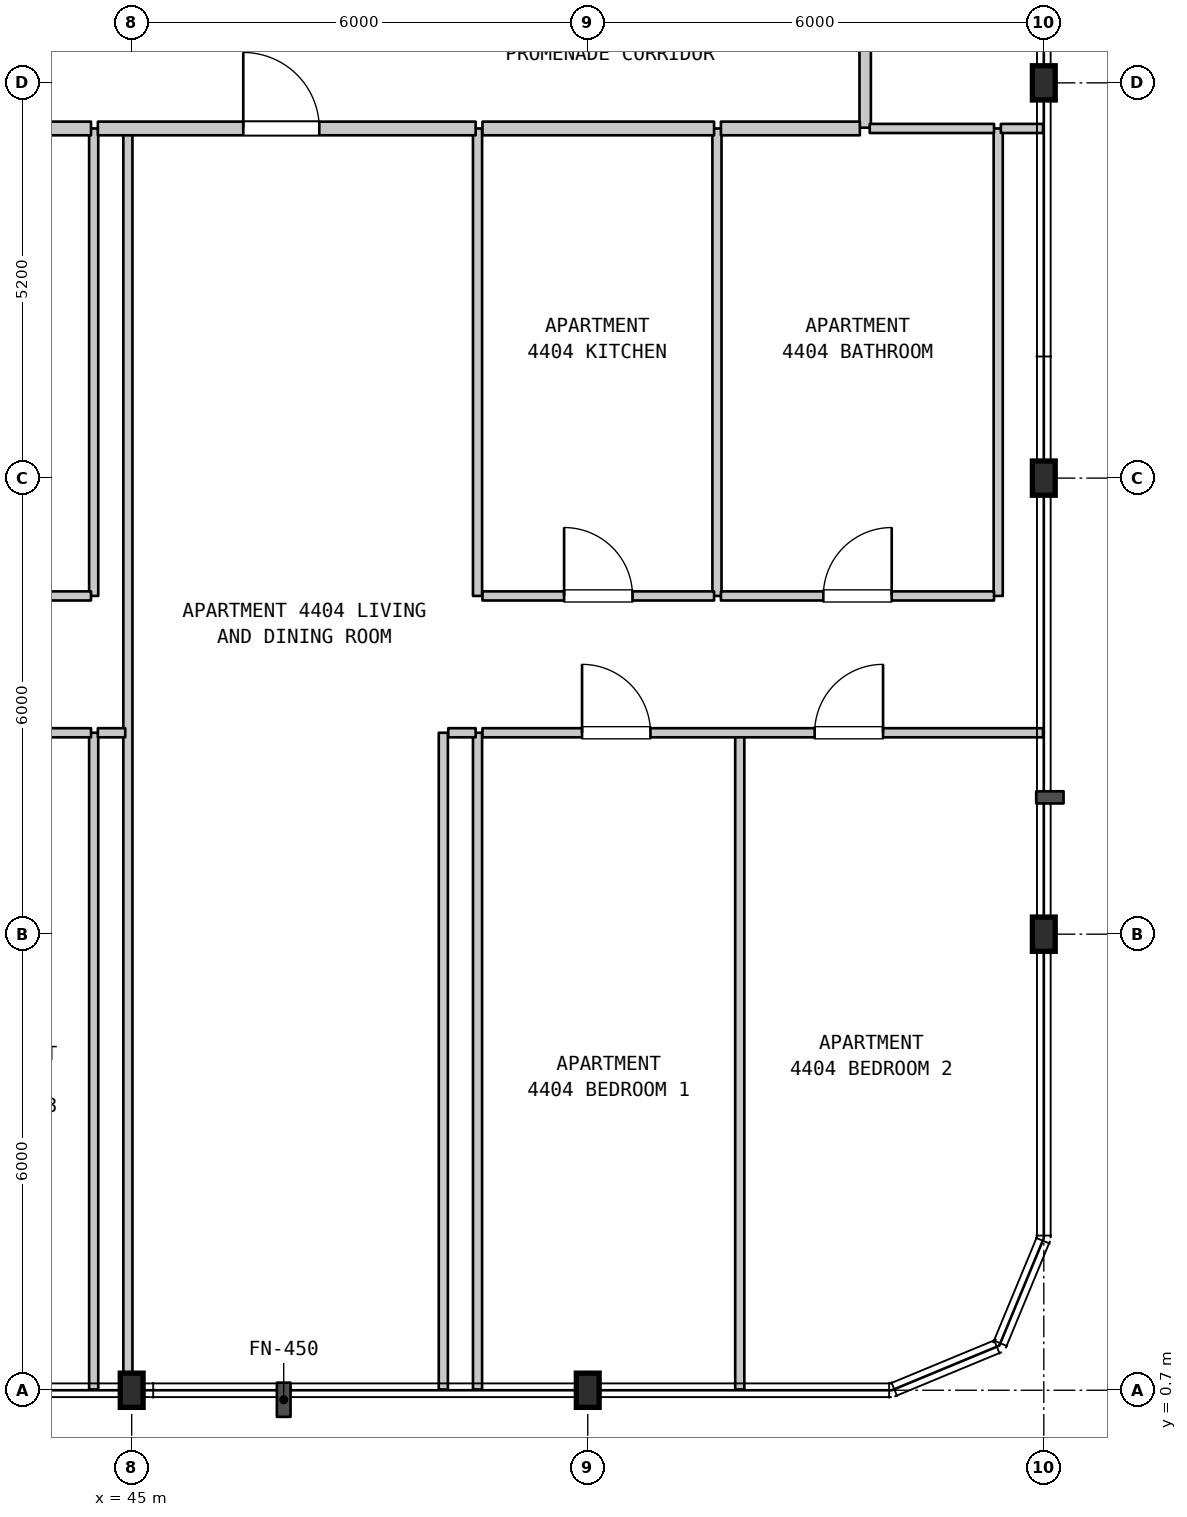
"""IFC4 building model, lengths in metres.
Left out: names, types, materials, properties, quantities, classifications, styles, units other than length and angle.
Written with IfcOpenShell. Run it as: python <this file> out.ifc"""

import sys

from ifc_helpers import new_model, si_unit, direction, frame, frame_2d, origin, origin_2d, place, context, subcontext, project, spatial, rectangle, i_section, extrude, element, fill, save


model = new_model("IFC4")
c1 = context("Model", 3, precision=1e-05, world=origin(), true_north=direction((0.0, 1.0)))
c2 = subcontext(c1, "Body", "Model", "MODEL_VIEW")
j1 = project(units=[si_unit("LENGTHUNIT", "METRE"), si_unit("PLANEANGLEUNIT", "RADIAN")], contexts=[c1])
p1 = place(None, origin())
s1 = spatial("IfcSite", under=j1, at=p1, CompositionType="ELEMENT")
p2 = place(p1, origin())
s2 = spatial("IfcBuilding", under=s1, at=p2, CompositionType="ELEMENT")
p3 = place(p2, frame((0.0, 0.0, 180.2)))
s3 = spatial("IfcBuildingStorey", under=s2, at=p3, CompositionType="ELEMENT", Elevation=180.2)
for number, where, z_axis, x_axis in (
    (1, (45.0, 0.7, 0.0), (0.0, 0.0, 1.0), (1.0, 0.0, 0.0)),
    (2, (51.0, 0.7, 0.0), (0.0, 0.0, 1.0), (1.0, 0.0, 0.0)),
    (3, (57.0, 6.7, 0.0), (0.0, 0.0, 1.0), (1.0, 0.0, 0.0)),
    (4, (57.0, 12.7, 0.0), (0.0, 0.0, 1.0), (1.0, 0.0, 0.0)),
    (5, (57.0, 17.9, 0.0), (0.0, 0.0, 1.0), (1.0, 0.0, 0.0)),
):
    element("IfcColumn", number, at=place(p3, frame(where, z_axis=z_axis, x_axis=x_axis)), inside=s3, PredefinedType="COLUMN", context=c2, shape_type="SweptSolid", body=[
        extrude(i_section(OverallWidth=0.3, OverallDepth=0.45, WebThickness=0.014, FlangeThickness=0.026, FilletRadius=0.027, at=origin_2d()), origin(), (0.0, 0.0, 1.0), 3.7),
    ])
p4 = place(p3, frame((44.5, 0.71, 0.0), z_axis=(0.0, 0.0, 1.0), x_axis=(0.0, 1.0, 0.0)))
e6 = element("IfcWall", 6, at=p4, inside=s3, PredefinedType="PARTITIONING", context=c2, shape_type="SweptSolid", body=[
    extrude(rectangle(XDim=8.64, YDim=0.12, at=frame_2d((4.32, 0.0))), origin(), (0.0, 0.0, 1.0), 3.38),
])
p5 = place(p3, frame((44.5, 11.15, 0.0), z_axis=(0.0, 0.0, 1.0), x_axis=(0.0, 1.0, 0.0)))
e7 = element("IfcWall", 7, at=p5, inside=s3, PredefinedType="PARTITIONING", context=c2, shape_type="SweptSolid", body=[
    extrude(rectangle(XDim=6.15, YDim=0.12, at=frame_2d((3.075, 0.0))), origin(), (0.0, 0.0, 1.0), 3.38),
])
p6 = place(p3, frame((44.95, 0.71, 0.0), z_axis=(0.0, 0.0, 1.0), x_axis=(0.0, 1.0, 0.0)))
e8 = element("IfcWall", 8, at=p6, inside=s3, PredefinedType="PARTITIONING", context=c2, shape_type="SweptSolid", body=[
    extrude(rectangle(XDim=16.59, YDim=0.12, at=frame_2d((8.295, 0.0))), origin(), (0.0, 0.0, 1.0), 3.38),
])
for number, where, z_axis, x_axis in (
    (9, (49.1, 0.71, 0.0), (0.0, 0.0, 1.0), (0.0, 1.0, 0.0)),
    (10, (49.55, 0.71, 0.0), (0.0, 0.0, 1.0), (0.0, 1.0, 0.0)),
):
    element("IfcWall", number, at=place(p3, frame(where, z_axis=z_axis, x_axis=x_axis)), inside=s3, PredefinedType="PARTITIONING", context=c2, shape_type="SweptSolid", body=[
        extrude(rectangle(XDim=8.64, YDim=0.12, at=frame_2d((4.32, 0.0))), origin(), (0.0, 0.0, 1.0), 3.38),
    ])
for number, where, z_axis, x_axis in (
    (11, (49.55, 11.15, 0.0), (0.0, 0.0, 1.0), (0.0, 1.0, 0.0)),
    (12, (52.7, 11.15, 0.0), (0.0, 0.0, 1.0), (0.0, 1.0, 0.0)),
):
    element("IfcWall", number, at=place(p3, frame(where, z_axis=z_axis, x_axis=x_axis)), inside=s3, PredefinedType="PARTITIONING", context=c2, shape_type="SweptSolid", body=[
        extrude(rectangle(XDim=6.15, YDim=0.12, at=frame_2d((3.075, 0.0))), origin(), (0.0, 0.0, 1.0), 3.38),
    ])
p7 = place(p3, frame((53.0, 0.71, 0.0), z_axis=(0.0, 0.0, 1.0), x_axis=(0.0, 1.0, 0.0)))
e13 = element("IfcWall", 13, at=p7, inside=s3, PredefinedType="PARTITIONING", context=c2, shape_type="SweptSolid", body=[
    extrude(rectangle(XDim=8.64, YDim=0.12, at=frame_2d((4.32, 0.0))), origin(), (0.0, 0.0, 1.0), 3.38),
])
p8 = place(p3, frame((54.65, 17.31, 0.0), z_axis=(0.0, 0.0, 1.0), x_axis=(0.0, 1.0, 0.0)))
e14 = element("IfcWall", 14, at=p8, inside=s3, PredefinedType="STANDARD", context=c2, shape_type="SweptSolid", body=[
    extrude(rectangle(XDim=2.19, YDim=0.15, at=frame_2d((1.095, 0.0))), origin(), (0.0, 0.0, 1.0), 3.38),
])
p9 = place(p3, frame((56.4, 11.15, 0.0), z_axis=(0.0, 0.0, 1.0), x_axis=(0.0, 1.0, 0.0)))
e15 = element("IfcWall", 15, at=p9, inside=s3, PredefinedType="PARTITIONING", context=c2, shape_type="SweptSolid", body=[
    extrude(rectangle(XDim=6.15, YDim=0.12, at=frame_2d((3.075, 0.0))), origin(), (0.0, 0.0, 1.0), 3.38),
])
p10 = place(p3, frame((37.425, 9.35, 0.0), z_axis=(0.0, 0.0, 1.0), x_axis=(1.0, 0.0, 0.0)))
e16 = element("IfcWall", 16, at=p10, inside=s3, PredefinedType="PARTITIONING", context=c2, shape_type="SweptSolid", body=[
    extrude(rectangle(XDim=7.04, YDim=0.12, at=frame_2d((3.52, 0.0))), origin(), (0.0, 0.0, 1.0), 3.38),
])
p11 = place(p10, frame((0.868, 0.0, 0.0)))
e17 = element("IfcOpeningElement", 17, at=p11, cuts=e16, PredefinedType="OPENING", context=c2, shape_type="SweptSolid", body=[
    extrude(rectangle(XDim=0.9, YDim=2.15, at=frame_2d((0.45, 1.075))), frame((0.0, 0.07, 0.0), z_axis=(0.0, -1.0, 0.0), x_axis=(1.0, 0.0, 0.0)), (0.0, 0.0, 1.0), 0.14),
])
p12 = place(p10, frame((2.999, 0.0, 0.0)))
e18 = element("IfcOpeningElement", 18, at=p12, cuts=e16, PredefinedType="OPENING", context=c2, shape_type="SweptSolid", body=[
    extrude(rectangle(XDim=0.9, YDim=2.15, at=frame_2d((0.45, 1.075))), frame((0.0, 0.07, 0.0), z_axis=(0.0, -1.0, 0.0), x_axis=(1.0, 0.0, 0.0)), (0.0, 0.0, 1.0), 0.14),
])
p13 = place(p10, frame((5.272, 0.0, 0.0)))
e19 = element("IfcOpeningElement", 19, at=p13, cuts=e16, PredefinedType="OPENING", context=c2, shape_type="SweptSolid", body=[
    extrude(rectangle(XDim=0.9, YDim=2.15, at=frame_2d((0.45, 1.075))), frame((0.0, 0.07, 0.0), z_axis=(0.0, -1.0, 0.0), x_axis=(1.0, 0.0, 0.0)), (0.0, 0.0, 1.0), 0.14),
])
p14 = place(p3, frame((44.555, 9.35, 0.0), z_axis=(0.0, 0.0, 1.0), x_axis=(1.0, 0.0, 0.0)))
e20 = element("IfcWall", 20, at=p14, inside=s3, PredefinedType="PARTITIONING", context=c2, shape_type="SweptSolid", body=[
    extrude(rectangle(XDim=0.36, YDim=0.12, at=frame_2d((0.18, 0.0))), origin(), (0.0, 0.0, 1.0), 3.38),
])
p15 = place(p3, frame((49.165, 9.35, 0.0), z_axis=(0.0, 0.0, 1.0), x_axis=(1.0, 0.0, 0.0)))
e21 = element("IfcWall", 21, at=p15, inside=s3, PredefinedType="PARTITIONING", context=c2, shape_type="SweptSolid", body=[
    extrude(rectangle(XDim=0.36, YDim=0.12, at=frame_2d((0.18, 0.0))), origin(), (0.0, 0.0, 1.0), 3.38),
])
p16 = place(p3, frame((49.615, 9.35, 0.0), z_axis=(0.0, 0.0, 1.0), x_axis=(1.0, 0.0, 0.0)))
e22 = element("IfcWall", 22, at=p16, inside=s3, PredefinedType="PARTITIONING", context=c2, shape_type="SweptSolid", body=[
    extrude(rectangle(XDim=7.375, YDim=0.12, at=frame_2d((3.688, 0.0))), origin(), (0.0, 0.0, 1.0), 3.38),
])
p17 = place(p16, frame((1.31, 0.0, 0.0)))
e23 = element("IfcOpeningElement", 23, at=p17, cuts=e22, PredefinedType="OPENING", context=c2, shape_type="SweptSolid", body=[
    extrude(rectangle(XDim=0.9, YDim=2.15, at=frame_2d((0.45, 1.075))), frame((0.0, 0.07, 0.0), z_axis=(0.0, -1.0, 0.0), x_axis=(1.0, 0.0, 0.0)), (0.0, 0.0, 1.0), 0.14),
])
p18 = place(p16, frame((4.37, 0.0, 0.0)))
e24 = element("IfcOpeningElement", 24, at=p18, cuts=e22, PredefinedType="OPENING", context=c2, shape_type="SweptSolid", body=[
    extrude(rectangle(XDim=0.9, YDim=2.15, at=frame_2d((0.45, 1.075))), frame((0.0, 0.07, 0.0), z_axis=(0.0, -1.0, 0.0), x_axis=(1.0, 0.0, 0.0)), (0.0, 0.0, 1.0), 0.14),
])
p19 = place(p3, frame((40.705, 11.15, 0.0), z_axis=(0.0, 0.0, 1.0), x_axis=(1.0, 0.0, 0.0)))
e25 = element("IfcWall", 25, at=p19, inside=s3, PredefinedType="PARTITIONING", context=c2, shape_type="SweptSolid", body=[
    extrude(rectangle(XDim=3.76, YDim=0.12, at=frame_2d((1.88, 0.0))), origin(), (0.0, 0.0, 1.0), 3.38),
])
p20 = place(p19, frame((1.358, 0.0, 0.0)))
e26 = element("IfcOpeningElement", 26, at=p20, cuts=e25, PredefinedType="OPENING", context=c2, shape_type="SweptSolid", body=[
    extrude(rectangle(XDim=0.9, YDim=2.1, at=frame_2d((0.45, 1.05))), frame((0.0, 0.07, 0.0), z_axis=(0.0, -1.0, 0.0), x_axis=(1.0, 0.0, 0.0)), (0.0, 0.0, 1.0), 0.14),
])
p21 = place(p3, frame((49.615, 11.15, 0.0), z_axis=(0.0, 0.0, 1.0), x_axis=(1.0, 0.0, 0.0)))
e27 = element("IfcWall", 27, at=p21, inside=s3, PredefinedType="PARTITIONING", context=c2, shape_type="SweptSolid", body=[
    extrude(rectangle(XDim=3.047, YDim=0.12, at=frame_2d((1.523, 0.0))), origin(), (0.0, 0.0, 1.0), 3.38),
])
p22 = place(p21, frame((1.074, 0.0, 0.0)))
e28 = element("IfcOpeningElement", 28, at=p22, cuts=e27, PredefinedType="OPENING", context=c2, shape_type="SweptSolid", body=[
    extrude(rectangle(XDim=0.9, YDim=2.15, at=frame_2d((0.45, 1.075))), frame((0.0, 0.07, 0.0), z_axis=(0.0, -1.0, 0.0), x_axis=(1.0, 0.0, 0.0)), (0.0, 0.0, 1.0), 0.14),
])
p23 = place(p3, frame((52.752, 11.15, 0.0), z_axis=(0.0, 0.0, 1.0), x_axis=(1.0, 0.0, 0.0)))
e29 = element("IfcWall", 29, at=p23, inside=s3, PredefinedType="PARTITIONING", context=c2, shape_type="SweptSolid", body=[
    extrude(rectangle(XDim=3.593, YDim=0.12, at=frame_2d((1.796, 0.0))), origin(), (0.0, 0.0, 1.0), 3.38),
])
p24 = place(p23, frame((1.347, 0.0, 0.0)))
e30 = element("IfcOpeningElement", 30, at=p24, cuts=e29, PredefinedType="OPENING", context=c2, shape_type="SweptSolid", body=[
    extrude(rectangle(XDim=0.9, YDim=2.1, at=frame_2d((0.45, 1.05))), frame((0.0, 0.07, 0.0), z_axis=(0.0, -1.0, 0.0), x_axis=(1.0, 0.0, 0.0)), (0.0, 0.0, 1.0), 0.14),
])
p25 = place(p3, frame((40.705, 17.3, 0.0), z_axis=(0.0, 0.0, 1.0), x_axis=(1.0, 0.0, 0.0)))
e31 = element("IfcWall", 31, at=p25, inside=s3, PredefinedType="STANDARD", context=c2, shape_type="SweptSolid", body=[
    extrude(rectangle(XDim=3.76, YDim=0.18, at=frame_2d((1.88, 0.0))), origin(), (0.0, 0.0, 1.0), 3.38),
])
p26 = place(p3, frame((44.555, 17.3, 0.0), z_axis=(0.0, 0.0, 1.0), x_axis=(1.0, 0.0, 0.0)))
e32 = element("IfcWall", 32, at=p26, inside=s3, PredefinedType="STANDARD", context=c2, shape_type="SweptSolid", body=[
    extrude(rectangle(XDim=4.97, YDim=0.18, at=frame_2d((2.485, 0.0))), origin(), (0.0, 0.0, 1.0), 3.38),
])
p27 = place(p26, frame((1.913, 0.0, 0.0)))
e33 = element("IfcOpeningElement", 33, at=p27, cuts=e32, PredefinedType="OPENING", context=c2, shape_type="SweptSolid", body=[
    extrude(rectangle(XDim=1.0, YDim=2.15, at=frame_2d((0.5, 1.075))), frame((0.0, 0.1, 0.0), z_axis=(0.0, -1.0, 0.0), x_axis=(1.0, 0.0, 0.0)), (0.0, 0.0, 1.0), 0.2),
])
p28 = place(p3, frame((49.615, 17.3, 0.0), z_axis=(0.0, 0.0, 1.0), x_axis=(1.0, 0.0, 0.0)))
e34 = element("IfcWall", 34, at=p28, inside=s3, PredefinedType="STANDARD", context=c2, shape_type="SweptSolid", body=[
    extrude(rectangle(XDim=3.047, YDim=0.18, at=frame_2d((1.523, 0.0))), origin(), (0.0, 0.0, 1.0), 3.38),
])
p29 = place(p3, frame((52.752, 17.3, 0.0), z_axis=(0.0, 0.0, 1.0), x_axis=(1.0, 0.0, 0.0)))
e35 = element("IfcWall", 35, at=p29, inside=s3, PredefinedType="STANDARD", context=c2, shape_type="SweptSolid", body=[
    extrude(rectangle(XDim=1.828, YDim=0.18, at=frame_2d((0.914, 0.0))), origin(), (0.0, 0.0, 1.0), 3.38),
])
p30 = place(p3, frame((54.71, 17.3, 0.0), z_axis=(0.0, 0.0, 1.0), x_axis=(1.0, 0.0, 0.0)))
e36 = element("IfcWall", 36, at=p30, inside=s3, PredefinedType="PARTITIONING", context=c2, shape_type="SweptSolid", body=[
    extrude(rectangle(XDim=1.635, YDim=0.12, at=frame_2d((0.817, 0.0))), origin(), (0.0, 0.0, 1.0), 3.38),
])
p31 = place(p3, frame((56.435, 17.3, 0.0), z_axis=(0.0, 0.0, 1.0), x_axis=(1.0, 0.0, 0.0)))
e37 = element("IfcWall", 37, at=p31, inside=s3, PredefinedType="PARTITIONING", context=c2, shape_type="SweptSolid", body=[
    extrude(rectangle(XDim=0.555, YDim=0.12, at=frame_2d((0.277, 0.0))), origin(), (0.0, 0.0, 1.0), 3.38),
])
p32 = place(p17, origin())
e38 = element("IfcDoor", 38, at=p32, inside=s3, OperationType="SINGLE_SWING_LEFT", PredefinedType="DOOR", context=c2, shape_type="SweptSolid", body=[
    extrude(rectangle(XDim=0.9, YDim=2.15, at=frame_2d((0.45, 1.075))), frame((0.0, 0.025, 0.0), z_axis=(0.0, -1.0, 0.0), x_axis=(1.0, 0.0, 0.0)), (0.0, 0.0, 1.0), 0.05),
])
fill(e23, e38)
p33 = place(p18, origin())
e39 = element("IfcDoor", 39, at=p33, inside=s3, OperationType="SINGLE_SWING_RIGHT", PredefinedType="DOOR", context=c2, shape_type="SweptSolid", body=[
    extrude(rectangle(XDim=0.9, YDim=2.15, at=frame_2d((0.45, 1.075))), frame((0.0, 0.025, 0.0), z_axis=(0.0, -1.0, 0.0), x_axis=(1.0, 0.0, 0.0)), (0.0, 0.0, 1.0), 0.05),
])
fill(e24, e39)
p34 = place(p22, origin())
e40 = element("IfcDoor", 40, at=p34, inside=s3, OperationType="SINGLE_SWING_LEFT", PredefinedType="DOOR", context=c2, shape_type="SweptSolid", body=[
    extrude(rectangle(XDim=0.9, YDim=2.15, at=frame_2d((0.45, 1.075))), frame((0.0, 0.025, 0.0), z_axis=(0.0, -1.0, 0.0), x_axis=(1.0, 0.0, 0.0)), (0.0, 0.0, 1.0), 0.05),
])
fill(e28, e40)
p35 = place(p24, origin())
e41 = element("IfcDoor", 41, at=p35, inside=s3, OperationType="SINGLE_SWING_RIGHT", PredefinedType="DOOR", context=c2, shape_type="SweptSolid", body=[
    extrude(rectangle(XDim=0.9, YDim=2.1, at=frame_2d((0.45, 1.05))), frame((0.0, 0.025, 0.0), z_axis=(0.0, -1.0, 0.0), x_axis=(1.0, 0.0, 0.0)), (0.0, 0.0, 1.0), 0.05),
])
fill(e30, e41)
p36 = place(p27, origin())
e42 = element("IfcDoor", 42, at=p36, inside=s3, OperationType="SINGLE_SWING_LEFT", PredefinedType="DOOR", context=c2, shape_type="SweptSolid", body=[
    extrude(rectangle(XDim=1.0, YDim=2.15, at=frame_2d((0.5, 1.075))), frame((0.0, 0.025, 0.0), z_axis=(0.0, -1.0, 0.0), x_axis=(1.0, 0.0, 0.0)), (0.0, 0.0, 1.0), 0.05),
])
fill(e33, e42)
save(model, sys.argv[1])
